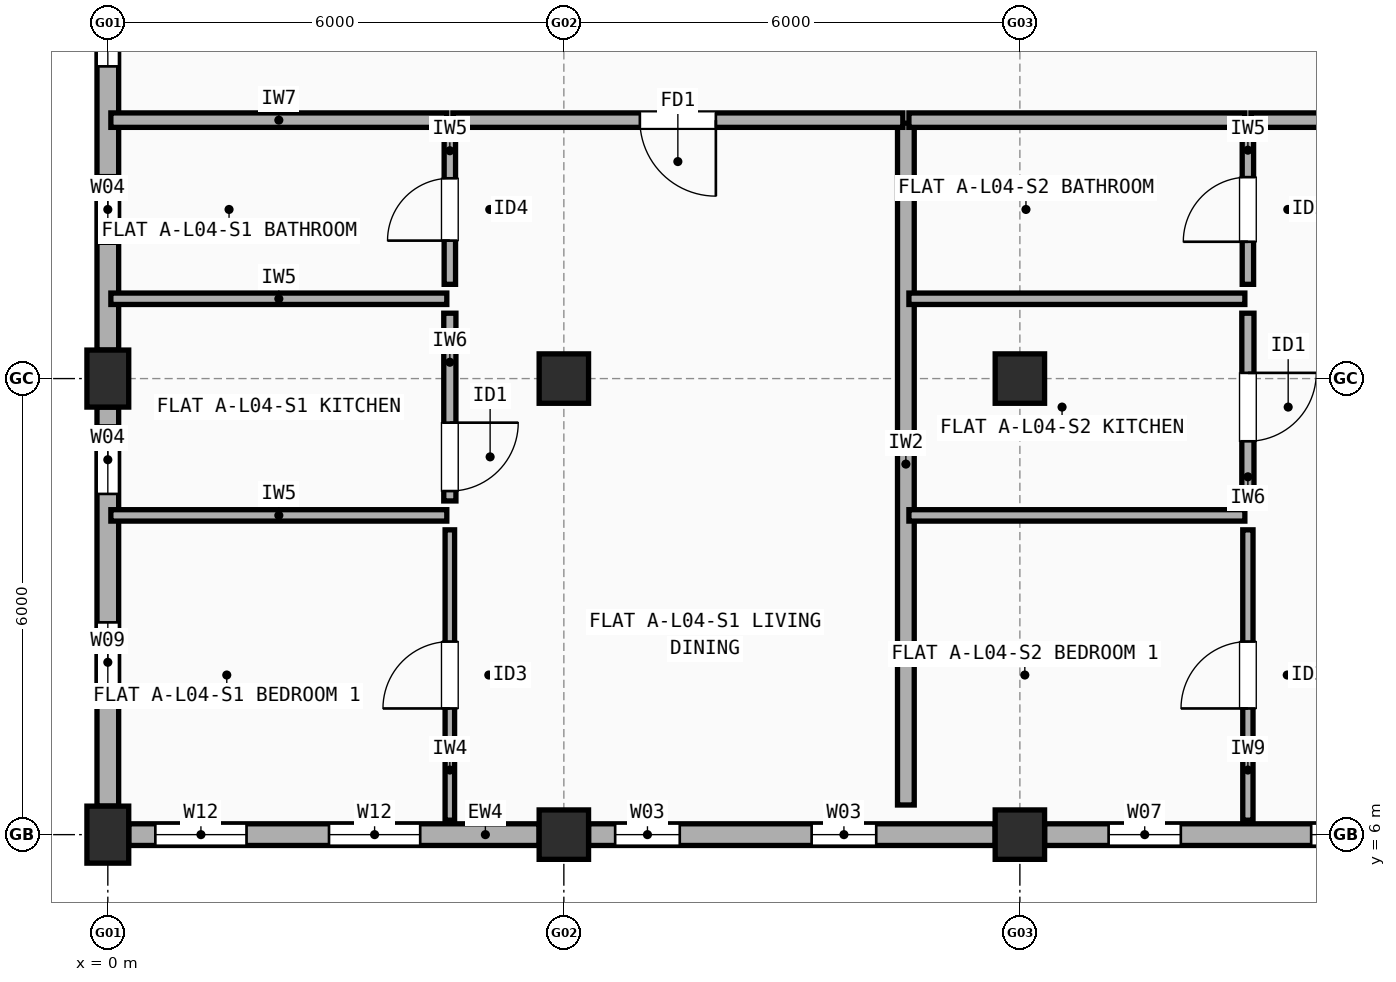
"""IFC4 building model, lengths in metres.
Left out: names, types, materials, properties, quantities, classifications, styles, units other than length and angle.
Written with IfcOpenShell. Run it as: python <this file> out.ifc"""

import sys

from ifc_helpers import new_model, si_unit, direction, frame, frame_2d, origin, origin_2d, place, context, subcontext, project, spatial, rectangle, extrude, element, fill, save


model = new_model("IFC4")
c1 = context("Model", 3, precision=1e-05, world=origin(), true_north=direction((0.0, 1.0)))
c2 = subcontext(c1, "Body", "Model", "MODEL_VIEW")
j1 = project(units=[si_unit("LENGTHUNIT", "METRE"), si_unit("PLANEANGLEUNIT", "RADIAN")], contexts=[c1])
p1 = place(None, origin())
s1 = spatial("IfcSite", under=j1, at=p1, CompositionType="ELEMENT")
p2 = place(p1, origin())
s2 = spatial("IfcBuilding", under=s1, at=p2, CompositionType="ELEMENT")
p3 = place(p2, frame((0.0, 0.0, 14.1)))
s3 = spatial("IfcBuildingStorey", under=s2, at=p3, CompositionType="ELEMENT", Elevation=14.1)
for number, where, z_axis, x_axis in (
    (1, (0.0, 6.0, 0.0), (0.0, 0.0, 1.0), (1.0, 0.0, 0.0)),
    (2, (0.0, 12.0, 0.0), (0.0, 0.0, 1.0), (1.0, 0.0, 0.0)),
):
    element("IfcColumn", number, at=place(p3, frame(where, z_axis=z_axis, x_axis=x_axis)), inside=s3, PredefinedType="COLUMN", context=c2, shape_type="SweptSolid", body=[
        extrude(rectangle(XDim=0.55, YDim=0.75, at=origin_2d()), origin(), (0.0, 0.0, 1.0), 2.95),
    ])
for number, where, z_axis, x_axis in (
    (3, (6.0, 6.0, 0.0), (0.0, 0.0, 1.0), (1.0, 0.0, 0.0)),
    (4, (6.0, 12.0, 0.0), (0.0, 0.0, 1.0), (1.0, 0.0, 0.0)),
    (5, (12.0, 6.0, 0.0), (0.0, 0.0, 1.0), (1.0, 0.0, 0.0)),
    (6, (12.0, 12.0, 0.0), (0.0, 0.0, 1.0), (1.0, 0.0, 0.0)),
):
    element("IfcColumn", number, at=place(p3, frame(where, z_axis=z_axis, x_axis=x_axis)), inside=s3, PredefinedType="COLUMN", context=c2, shape_type="SweptSolid", body=[
        extrude(rectangle(XDim=0.65, YDim=0.65, at=origin_2d()), origin(), (0.0, 0.0, 1.0), 2.95),
    ])
p4 = place(p3, frame((0.275, 6.0, 0.0), z_axis=(0.0, 0.0, 1.0), x_axis=(1.0, 0.0, 0.0)))
e7 = element("IfcWall", 7, at=p4, inside=s3, PredefinedType="STANDARD", context=c2, shape_type="SweptSolid", body=[
    extrude(rectangle(XDim=5.4, YDim=0.285, at=frame_2d((2.7, 0.0))), origin(), (0.0, 0.0, 1.0), 2.432),
])
p5 = place(p4, frame((0.35, 0.0, 0.9)))
e8 = element("IfcOpeningElement", 8, at=p5, cuts=e7, PredefinedType="OPENING", context=c2, shape_type="SweptSolid", body=[
    extrude(rectangle(XDim=1.2, YDim=1.35, at=frame_2d((0.6, 0.675))), frame((0.0, 0.152, 0.0), z_axis=(0.0, -1.0, 0.0), x_axis=(1.0, 0.0, 0.0)), (0.0, 0.0, 1.0), 0.305),
])
p6 = place(p4, frame((2.635, 0.0, 0.9)))
e9 = element("IfcOpeningElement", 9, at=p6, cuts=e7, PredefinedType="OPENING", context=c2, shape_type="SweptSolid", body=[
    extrude(rectangle(XDim=1.2, YDim=1.35, at=frame_2d((0.6, 0.675))), frame((0.0, 0.152, 0.0), z_axis=(0.0, -1.0, 0.0), x_axis=(1.0, 0.0, 0.0)), (0.0, 0.0, 1.0), 0.305),
])
p7 = place(p3, frame((6.325, 6.0, 0.0), z_axis=(0.0, 0.0, 1.0), x_axis=(1.0, 0.0, 0.0)))
e10 = element("IfcWall", 10, at=p7, inside=s3, PredefinedType="STANDARD", context=c2, shape_type="SweptSolid", body=[
    extrude(rectangle(XDim=5.35, YDim=0.285, at=frame_2d((2.675, 0.0))), origin(), (0.0, 0.0, 1.0), 2.432),
])
p8 = place(p7, frame((0.35, 0.0, 0.9)))
e11 = element("IfcOpeningElement", 11, at=p8, cuts=e10, PredefinedType="OPENING", context=c2, shape_type="SweptSolid", body=[
    extrude(rectangle(XDim=0.85, YDim=1.25, at=frame_2d((0.425, 0.625))), frame((0.0, 0.152, 0.0), z_axis=(0.0, -1.0, 0.0), x_axis=(1.0, 0.0, 0.0)), (0.0, 0.0, 1.0), 0.305),
])
p9 = place(p7, frame((2.935, 0.0, 0.9)))
e12 = element("IfcOpeningElement", 12, at=p9, cuts=e10, PredefinedType="OPENING", context=c2, shape_type="SweptSolid", body=[
    extrude(rectangle(XDim=0.85, YDim=1.25, at=frame_2d((0.425, 0.625))), frame((0.0, 0.152, 0.0), z_axis=(0.0, -1.0, 0.0), x_axis=(1.0, 0.0, 0.0)), (0.0, 0.0, 1.0), 0.305),
])
p10 = place(p3, frame((12.325, 6.0, 0.0), z_axis=(0.0, 0.0, 1.0), x_axis=(1.0, 0.0, 0.0)))
e13 = element("IfcWall", 13, at=p10, inside=s3, PredefinedType="STANDARD", context=c2, shape_type="SweptSolid", body=[
    extrude(rectangle(XDim=5.35, YDim=0.285, at=frame_2d((2.675, 0.0))), origin(), (0.0, 0.0, 1.0), 2.432),
])
p11 = place(p10, frame((0.843, 0.0, 0.9)))
e14 = element("IfcOpeningElement", 14, at=p11, cuts=e13, PredefinedType="OPENING", context=c2, shape_type="SweptSolid", body=[
    extrude(rectangle(XDim=0.95, YDim=1.35, at=frame_2d((0.475, 0.675))), frame((0.0, 0.152, 0.0), z_axis=(0.0, -1.0, 0.0), x_axis=(1.0, 0.0, 0.0)), (0.0, 0.0, 1.0), 0.305),
])
p12 = place(p10, frame((3.508, 0.0, 0.9)))
e15 = element("IfcOpeningElement", 15, at=p12, cuts=e13, PredefinedType="OPENING", context=c2, shape_type="SweptSolid", body=[
    extrude(rectangle(XDim=1.05, YDim=1.35, at=frame_2d((0.525, 0.675))), frame((0.0, 0.152, 0.0), z_axis=(0.0, -1.0, 0.0), x_axis=(1.0, 0.0, 0.0)), (0.0, 0.0, 1.0), 0.305),
])
p13 = place(p3, frame((0.0, 17.625, 0.0), z_axis=(0.0, 0.0, 1.0), x_axis=(0.0, -1.0, 0.0)))
e16 = element("IfcWall", 16, at=p13, inside=s3, PredefinedType="STANDARD", context=c2, shape_type="SweptSolid", body=[
    extrude(rectangle(XDim=5.25, YDim=0.285, at=frame_2d((2.625, 0.0))), origin(), (0.0, 0.0, 1.0), 2.432),
])
p14 = place(p13, frame((0.667, 0.0, 0.9)))
e17 = element("IfcOpeningElement", 17, at=p14, cuts=e16, PredefinedType="OPENING", context=c2, shape_type="SweptSolid", body=[
    extrude(rectangle(XDim=0.85, YDim=1.25, at=frame_2d((0.425, 0.625))), frame((0.0, 0.152, 0.0), z_axis=(0.0, -1.0, 0.0), x_axis=(1.0, 0.0, 0.0)), (0.0, 0.0, 1.0), 0.305),
])
p15 = place(p13, frame((2.95, 0.0, 0.9)))
e18 = element("IfcOpeningElement", 18, at=p15, cuts=e16, PredefinedType="OPENING", context=c2, shape_type="SweptSolid", body=[
    extrude(rectangle(XDim=0.9, YDim=1.3, at=frame_2d((0.45, 0.65))), frame((0.0, 0.152, 0.0), z_axis=(0.0, -1.0, 0.0), x_axis=(1.0, 0.0, 0.0)), (0.0, 0.0, 1.0), 0.305),
])
p16 = place(p3, frame((0.0, 11.625, 0.0), z_axis=(0.0, 0.0, 1.0), x_axis=(0.0, -1.0, 0.0)))
e19 = element("IfcWall", 19, at=p16, inside=s3, PredefinedType="STANDARD", context=c2, shape_type="SweptSolid", body=[
    extrude(rectangle(XDim=5.25, YDim=0.285, at=frame_2d((2.625, 0.0))), origin(), (0.0, 0.0, 1.0), 2.432),
])
p17 = place(p16, frame((0.242, 0.0, 0.9)))
e20 = element("IfcOpeningElement", 20, at=p17, cuts=e19, PredefinedType="OPENING", context=c2, shape_type="SweptSolid", body=[
    extrude(rectangle(XDim=0.9, YDim=1.3, at=frame_2d((0.45, 0.65))), frame((0.0, 0.152, 0.0), z_axis=(0.0, -1.0, 0.0), x_axis=(1.0, 0.0, 0.0)), (0.0, 0.0, 1.0), 0.305),
])
p18 = place(p16, frame((2.833, 0.0, 0.9)))
e21 = element("IfcOpeningElement", 21, at=p18, cuts=e19, PredefinedType="OPENING", context=c2, shape_type="SweptSolid", body=[
    extrude(rectangle(XDim=1.05, YDim=1.35, at=frame_2d((0.525, 0.675))), frame((0.0, 0.152, 0.0), z_axis=(0.0, -1.0, 0.0), x_axis=(1.0, 0.0, 0.0)), (0.0, 0.0, 1.0), 0.305),
])
p19 = place(p3, frame((10.5, 6.39, 0.0), z_axis=(0.0, 0.0, 1.0), x_axis=(0.0, 1.0, 0.0)))
e22 = element("IfcWall", 22, at=p19, inside=s3, PredefinedType="SOLIDWALL", context=c2, shape_type="SweptSolid", body=[
    extrude(rectangle(XDim=8.97, YDim=0.22, at=frame_2d((4.485, 0.0))), origin(), (0.0, 0.0, 1.0), 2.548),
])
p20 = place(p3, frame((0.04, 15.4, 0.0), z_axis=(0.0, 0.0, 1.0), x_axis=(1.0, 0.0, 0.0)))
e23 = element("IfcWall", 23, at=p20, inside=s3, PredefinedType="SOLIDWALL", context=c2, shape_type="SweptSolid", body=[
    extrude(rectangle(XDim=4.42, YDim=0.19, at=frame_2d((2.21, 0.0))), origin(), (0.0, 0.0, 1.0), 2.432),
])
p21 = place(p3, frame((4.54, 15.4, 0.0), z_axis=(0.0, 0.0, 1.0), x_axis=(1.0, 0.0, 0.0)))
e24 = element("IfcWall", 24, at=p21, inside=s3, PredefinedType="SOLIDWALL", context=c2, shape_type="SweptSolid", body=[
    extrude(rectangle(XDim=5.92, YDim=0.19, at=frame_2d((2.96, 0.0))), origin(), (0.0, 0.0, 1.0), 2.508),
])
p22 = place(p21, frame((2.46, 0.0, 0.0)))
e25 = element("IfcOpeningElement", 25, at=p22, cuts=e24, PredefinedType="OPENING", context=c2, shape_type="SweptSolid", body=[
    extrude(rectangle(XDim=1.0, YDim=2.15, at=frame_2d((0.5, 1.075))), frame((0.0, 0.105, 0.0), z_axis=(0.0, -1.0, 0.0), x_axis=(1.0, 0.0, 0.0)), (0.0, 0.0, 1.0), 0.21),
])
p23 = place(p3, frame((4.5, 6.19, 0.0), z_axis=(0.0, 0.0, 1.0), x_axis=(0.0, 1.0, 0.0)))
e26 = element("IfcWall", 26, at=p23, inside=s3, PredefinedType="PARTITIONING", context=c2, shape_type="SweptSolid", body=[
    extrude(rectangle(XDim=3.82, YDim=0.125, at=frame_2d((1.91, 0.0))), origin(), (0.0, 0.0, 1.0), 2.95),
])
p24 = place(p23, frame((1.47, 0.0, 0.0)))
e27 = element("IfcOpeningElement", 27, at=p24, cuts=e26, PredefinedType="OPENING", context=c2, shape_type="SweptSolid", body=[
    extrude(rectangle(XDim=0.88, YDim=2.1, at=frame_2d((0.44, 1.05))), frame((0.0, 0.073, 0.0), z_axis=(0.0, -1.0, 0.0), x_axis=(1.0, 0.0, 0.0)), (0.0, 0.0, 1.0), 0.145),
])
p25 = place(p3, frame((4.5, 10.39, 0.0), z_axis=(0.0, 0.0, 1.0), x_axis=(0.0, 1.0, 0.0)))
e28 = element("IfcWall", 28, at=p25, inside=s3, PredefinedType="PLUMBINGWALL", context=c2, shape_type="SweptSolid", body=[
    extrude(rectangle(XDim=2.47, YDim=0.16, at=frame_2d((1.235, 0.0))), origin(), (0.0, 0.0, 1.0), 2.408),
])
p26 = place(p25, frame((0.13, 0.0, 0.0)))
e29 = element("IfcOpeningElement", 29, at=p26, cuts=e28, PredefinedType="OPENING", context=c2, shape_type="SweptSolid", body=[
    extrude(rectangle(XDim=0.9, YDim=2.1, at=frame_2d((0.45, 1.05))), frame((0.0, 0.09, 0.0), z_axis=(0.0, -1.0, 0.0), x_axis=(1.0, 0.0, 0.0)), (0.0, 0.0, 1.0), 0.18),
])
p27 = place(p3, frame((4.5, 13.24, 0.0), z_axis=(0.0, 0.0, 1.0), x_axis=(0.0, 1.0, 0.0)))
e30 = element("IfcWall", 30, at=p27, inside=s3, PredefinedType="PARTITIONING", context=c2, shape_type="SweptSolid", body=[
    extrude(rectangle(XDim=1.97, YDim=0.15, at=frame_2d((0.985, 0.0))), origin(), (0.0, 0.0, 1.0), 2.95),
])
p28 = place(p27, frame((0.575, 0.0, 0.0)))
e31 = element("IfcOpeningElement", 31, at=p28, cuts=e30, PredefinedType="OPENING", context=c2, shape_type="SweptSolid", body=[
    extrude(rectangle(XDim=0.82, YDim=2.08, at=frame_2d((0.41, 1.04))), frame((0.0, 0.085, 0.0), z_axis=(0.0, -1.0, 0.0), x_axis=(1.0, 0.0, 0.0)), (0.0, 0.0, 1.0), 0.17),
])
for number, where, z_axis, x_axis in (
    (32, (0.04, 10.2, 0.0), (0.0, 0.0, 1.0), (1.0, 0.0, 0.0)),
    (33, (0.04, 13.05, 0.0), (0.0, 0.0, 1.0), (1.0, 0.0, 0.0)),
):
    element("IfcWall", number, at=place(p3, frame(where, z_axis=z_axis, x_axis=x_axis)), inside=s3, PredefinedType="PARTITIONING", context=c2, shape_type="SweptSolid", body=[
        extrude(rectangle(XDim=4.42, YDim=0.15, at=frame_2d((2.21, 0.0))), origin(), (0.0, 0.0, 1.0), 2.432),
    ])
p29 = place(p3, frame((10.54, 15.4, 0.0), z_axis=(0.0, 0.0, 1.0), x_axis=(1.0, 0.0, 0.0)))
e34 = element("IfcWall", 34, at=p29, inside=s3, PredefinedType="SOLIDWALL", context=c2, shape_type="SweptSolid", body=[
    extrude(rectangle(XDim=4.42, YDim=0.19, at=frame_2d((2.21, 0.0))), origin(), (0.0, 0.0, 1.0), 2.458),
])
p30 = place(p3, frame((15.04, 15.4, 0.0), z_axis=(0.0, 0.0, 1.0), x_axis=(1.0, 0.0, 0.0)))
e35 = element("IfcWall", 35, at=p30, inside=s3, PredefinedType="SOLIDWALL", context=c2, shape_type="SweptSolid", body=[
    extrude(rectangle(XDim=4.42, YDim=0.19, at=frame_2d((2.21, 0.0))), origin(), (0.0, 0.0, 1.0), 2.508),
])
p31 = place(p30, frame((1.72, 0.0, 0.0)))
e36 = element("IfcOpeningElement", 36, at=p31, cuts=e35, PredefinedType="OPENING", context=c2, shape_type="SweptSolid", body=[
    extrude(rectangle(XDim=0.98, YDim=2.15, at=frame_2d((0.49, 1.075))), frame((0.0, 0.105, 0.0), z_axis=(0.0, -1.0, 0.0), x_axis=(1.0, 0.0, 0.0)), (0.0, 0.0, 1.0), 0.21),
])
p32 = place(p3, frame((15.0, 6.19, 0.0), z_axis=(0.0, 0.0, 1.0), x_axis=(0.0, 1.0, 0.0)))
e37 = element("IfcWall", 37, at=p32, inside=s3, PredefinedType="PARTITIONING", context=c2, shape_type="SweptSolid", body=[
    extrude(rectangle(XDim=3.82, YDim=0.135, at=frame_2d((1.91, 0.0))), origin(), (0.0, 0.0, 1.0), 2.95),
])
p33 = place(p32, frame((1.47, 0.0, 0.0)))
e38 = element("IfcOpeningElement", 38, at=p33, cuts=e37, PredefinedType="OPENING", context=c2, shape_type="SweptSolid", body=[
    extrude(rectangle(XDim=0.88, YDim=2.1, at=frame_2d((0.44, 1.05))), frame((0.0, 0.077, 0.0), z_axis=(0.0, -1.0, 0.0), x_axis=(1.0, 0.0, 0.0)), (0.0, 0.0, 1.0), 0.155),
])
p34 = place(p3, frame((15.0, 10.39, 0.0), z_axis=(0.0, 0.0, 1.0), x_axis=(0.0, 1.0, 0.0)))
e39 = element("IfcWall", 39, at=p34, inside=s3, PredefinedType="PLUMBINGWALL", context=c2, shape_type="SweptSolid", body=[
    extrude(rectangle(XDim=2.47, YDim=0.16, at=frame_2d((1.235, 0.0))), origin(), (0.0, 0.0, 1.0), 2.508),
])
p35 = place(p34, frame((0.785, 0.0, 0.0)))
e40 = element("IfcOpeningElement", 40, at=p35, cuts=e39, PredefinedType="OPENING", context=c2, shape_type="SweptSolid", body=[
    extrude(rectangle(XDim=0.9, YDim=2.1, at=frame_2d((0.45, 1.05))), frame((0.0, 0.09, 0.0), z_axis=(0.0, -1.0, 0.0), x_axis=(1.0, 0.0, 0.0)), (0.0, 0.0, 1.0), 0.18),
])
p36 = place(p3, frame((15.0, 13.24, 0.0), z_axis=(0.0, 0.0, 1.0), x_axis=(0.0, 1.0, 0.0)))
e41 = element("IfcWall", 41, at=p36, inside=s3, PredefinedType="PARTITIONING", context=c2, shape_type="SweptSolid", body=[
    extrude(rectangle(XDim=1.97, YDim=0.15, at=frame_2d((0.985, 0.0))), origin(), (0.0, 0.0, 1.0), 2.95),
])
p37 = place(p36, frame((0.56, 0.0, 0.0)))
e42 = element("IfcOpeningElement", 42, at=p37, cuts=e41, PredefinedType="OPENING", context=c2, shape_type="SweptSolid", body=[
    extrude(rectangle(XDim=0.85, YDim=2.1, at=frame_2d((0.425, 1.05))), frame((0.0, 0.085, 0.0), z_axis=(0.0, -1.0, 0.0), x_axis=(1.0, 0.0, 0.0)), (0.0, 0.0, 1.0), 0.17),
])
p38 = place(p3, frame((10.54, 10.2, 0.0), z_axis=(0.0, 0.0, 1.0), x_axis=(1.0, 0.0, 0.0)))
e43 = element("IfcWall", 43, at=p38, inside=s3, PredefinedType="PARTITIONING", context=c2, shape_type="SweptSolid", body=[
    extrude(rectangle(XDim=4.42, YDim=0.15, at=frame_2d((2.21, 0.0))), origin(), (0.0, 0.0, 1.0), 2.508),
])
p39 = place(p3, frame((10.54, 13.05, 0.0), z_axis=(0.0, 0.0, 1.0), x_axis=(1.0, 0.0, 0.0)))
e44 = element("IfcWall", 44, at=p39, inside=s3, PredefinedType="PARTITIONING", context=c2, shape_type="SweptSolid", body=[
    extrude(rectangle(XDim=4.42, YDim=0.15, at=frame_2d((2.21, 0.0))), origin(), (0.0, 0.0, 1.0), 2.458),
])
p40 = place(p5, origin())
e45 = element("IfcWindow", 45, at=p40, inside=s3, PartitioningType="SINGLE_PANEL", PredefinedType="WINDOW", context=c2, shape_type="SweptSolid", body=[
    extrude(rectangle(XDim=1.2, YDim=1.35, at=frame_2d((0.6, 0.675))), frame((0.0, 0.03, 0.0), z_axis=(0.0, -1.0, 0.0), x_axis=(1.0, 0.0, 0.0)), (0.0, 0.0, 1.0), 0.06),
])
fill(e8, e45)
p41 = place(p6, origin())
e46 = element("IfcWindow", 46, at=p41, inside=s3, PartitioningType="SINGLE_PANEL", PredefinedType="WINDOW", context=c2, shape_type="SweptSolid", body=[
    extrude(rectangle(XDim=1.2, YDim=1.35, at=frame_2d((0.6, 0.675))), frame((0.0, 0.03, 0.0), z_axis=(0.0, -1.0, 0.0), x_axis=(1.0, 0.0, 0.0)), (0.0, 0.0, 1.0), 0.06),
])
fill(e9, e46)
p42 = place(p8, origin())
e47 = element("IfcWindow", 47, at=p42, inside=s3, PartitioningType="SINGLE_PANEL", PredefinedType="WINDOW", context=c2, shape_type="SweptSolid", body=[
    extrude(rectangle(XDim=0.85, YDim=1.25, at=frame_2d((0.425, 0.625))), frame((0.0, 0.03, 0.0), z_axis=(0.0, -1.0, 0.0), x_axis=(1.0, 0.0, 0.0)), (0.0, 0.0, 1.0), 0.06),
])
fill(e11, e47)
p43 = place(p9, origin())
e48 = element("IfcWindow", 48, at=p43, inside=s3, PartitioningType="SINGLE_PANEL", PredefinedType="WINDOW", context=c2, shape_type="SweptSolid", body=[
    extrude(rectangle(XDim=0.85, YDim=1.25, at=frame_2d((0.425, 0.625))), frame((0.0, 0.03, 0.0), z_axis=(0.0, -1.0, 0.0), x_axis=(1.0, 0.0, 0.0)), (0.0, 0.0, 1.0), 0.06),
])
fill(e12, e48)
p44 = place(p11, origin())
e49 = element("IfcWindow", 49, at=p44, inside=s3, PartitioningType="SINGLE_PANEL", PredefinedType="WINDOW", context=c2, shape_type="SweptSolid", body=[
    extrude(rectangle(XDim=0.95, YDim=1.35, at=frame_2d((0.475, 0.675))), frame((0.0, 0.03, 0.0), z_axis=(0.0, -1.0, 0.0), x_axis=(1.0, 0.0, 0.0)), (0.0, 0.0, 1.0), 0.06),
])
fill(e14, e49)
p45 = place(p12, origin())
e50 = element("IfcWindow", 50, at=p45, inside=s3, PartitioningType="SINGLE_PANEL", PredefinedType="WINDOW", context=c2, shape_type="SweptSolid", body=[
    extrude(rectangle(XDim=1.05, YDim=1.35, at=frame_2d((0.525, 0.675))), frame((0.0, 0.03, 0.0), z_axis=(0.0, -1.0, 0.0), x_axis=(1.0, 0.0, 0.0)), (0.0, 0.0, 1.0), 0.06),
])
fill(e15, e50)
p46 = place(p14, origin())
e51 = element("IfcWindow", 51, at=p46, inside=s3, PartitioningType="SINGLE_PANEL", PredefinedType="WINDOW", context=c2, shape_type="SweptSolid", body=[
    extrude(rectangle(XDim=0.85, YDim=1.25, at=frame_2d((0.425, 0.625))), frame((0.0, 0.03, 0.0), z_axis=(0.0, -1.0, 0.0), x_axis=(1.0, 0.0, 0.0)), (0.0, 0.0, 1.0), 0.06),
])
fill(e17, e51)
p47 = place(p15, origin())
e52 = element("IfcWindow", 52, at=p47, inside=s3, PartitioningType="SINGLE_PANEL", PredefinedType="WINDOW", context=c2, shape_type="SweptSolid", body=[
    extrude(rectangle(XDim=0.9, YDim=1.3, at=frame_2d((0.45, 0.65))), frame((0.0, 0.03, 0.0), z_axis=(0.0, -1.0, 0.0), x_axis=(1.0, 0.0, 0.0)), (0.0, 0.0, 1.0), 0.06),
])
fill(e18, e52)
p48 = place(p17, origin())
e53 = element("IfcWindow", 53, at=p48, inside=s3, PartitioningType="SINGLE_PANEL", PredefinedType="WINDOW", context=c2, shape_type="SweptSolid", body=[
    extrude(rectangle(XDim=0.9, YDim=1.3, at=frame_2d((0.45, 0.65))), frame((0.0, 0.03, 0.0), z_axis=(0.0, -1.0, 0.0), x_axis=(1.0, 0.0, 0.0)), (0.0, 0.0, 1.0), 0.06),
])
fill(e20, e53)
p49 = place(p18, origin())
e54 = element("IfcWindow", 54, at=p49, inside=s3, PartitioningType="SINGLE_PANEL", PredefinedType="WINDOW", context=c2, shape_type="SweptSolid", body=[
    extrude(rectangle(XDim=1.05, YDim=1.35, at=frame_2d((0.525, 0.675))), frame((0.0, 0.03, 0.0), z_axis=(0.0, -1.0, 0.0), x_axis=(1.0, 0.0, 0.0)), (0.0, 0.0, 1.0), 0.06),
])
fill(e21, e54)
p50 = place(p22, origin())
e55 = element("IfcDoor", 55, at=p50, inside=s3, OperationType="SINGLE_SWING_RIGHT", PredefinedType="DOOR", context=c2, shape_type="SweptSolid", body=[
    extrude(rectangle(XDim=1.0, YDim=2.15, at=frame_2d((0.5, 1.075))), frame((0.0, 0.025, 0.0), z_axis=(0.0, -1.0, 0.0), x_axis=(1.0, 0.0, 0.0)), (0.0, 0.0, 1.0), 0.05),
])
fill(e25, e55)
p51 = place(p24, origin())
e56 = element("IfcDoor", 56, at=p51, inside=s3, OperationType="SINGLE_SWING_LEFT", PredefinedType="DOOR", context=c2, shape_type="SweptSolid", body=[
    extrude(rectangle(XDim=0.88, YDim=2.1, at=frame_2d((0.44, 1.05))), frame((0.0, 0.025, 0.0), z_axis=(0.0, -1.0, 0.0), x_axis=(1.0, 0.0, 0.0)), (0.0, 0.0, 1.0), 0.05),
])
fill(e27, e56)
p52 = place(p26, origin())
e57 = element("IfcDoor", 57, at=p52, inside=s3, OperationType="SINGLE_SWING_RIGHT", PredefinedType="DOOR", context=c2, shape_type="SweptSolid", body=[
    extrude(rectangle(XDim=0.9, YDim=2.1, at=frame_2d((0.45, 1.05))), frame((0.0, 0.025, 0.0), z_axis=(0.0, -1.0, 0.0), x_axis=(1.0, 0.0, 0.0)), (0.0, 0.0, 1.0), 0.05),
])
fill(e29, e57)
p53 = place(p28, origin())
e58 = element("IfcDoor", 58, at=p53, inside=s3, OperationType="SINGLE_SWING_LEFT", PredefinedType="DOOR", context=c2, shape_type="SweptSolid", body=[
    extrude(rectangle(XDim=0.82, YDim=2.08, at=frame_2d((0.41, 1.04))), frame((0.0, 0.025, 0.0), z_axis=(0.0, -1.0, 0.0), x_axis=(1.0, 0.0, 0.0)), (0.0, 0.0, 1.0), 0.05),
])
fill(e31, e58)
p54 = place(p33, origin())
e59 = element("IfcDoor", 59, at=p54, inside=s3, OperationType="SINGLE_SWING_LEFT", PredefinedType="DOOR", context=c2, shape_type="SweptSolid", body=[
    extrude(rectangle(XDim=0.88, YDim=2.1, at=frame_2d((0.44, 1.05))), frame((0.0, 0.025, 0.0), z_axis=(0.0, -1.0, 0.0), x_axis=(1.0, 0.0, 0.0)), (0.0, 0.0, 1.0), 0.05),
])
fill(e38, e59)
p55 = place(p35, origin())
e60 = element("IfcDoor", 60, at=p55, inside=s3, OperationType="SINGLE_SWING_RIGHT", PredefinedType="DOOR", context=c2, shape_type="SweptSolid", body=[
    extrude(rectangle(XDim=0.9, YDim=2.1, at=frame_2d((0.45, 1.05))), frame((0.0, 0.025, 0.0), z_axis=(0.0, -1.0, 0.0), x_axis=(1.0, 0.0, 0.0)), (0.0, 0.0, 1.0), 0.05),
])
fill(e40, e60)
p56 = place(p37, origin())
e61 = element("IfcDoor", 61, at=p56, inside=s3, OperationType="SINGLE_SWING_LEFT", PredefinedType="DOOR", context=c2, shape_type="SweptSolid", body=[
    extrude(rectangle(XDim=0.85, YDim=2.1, at=frame_2d((0.425, 1.05))), frame((0.0, 0.025, 0.0), z_axis=(0.0, -1.0, 0.0), x_axis=(1.0, 0.0, 0.0)), (0.0, 0.0, 1.0), 0.05),
])
fill(e42, e61)
save(model, sys.argv[1])
